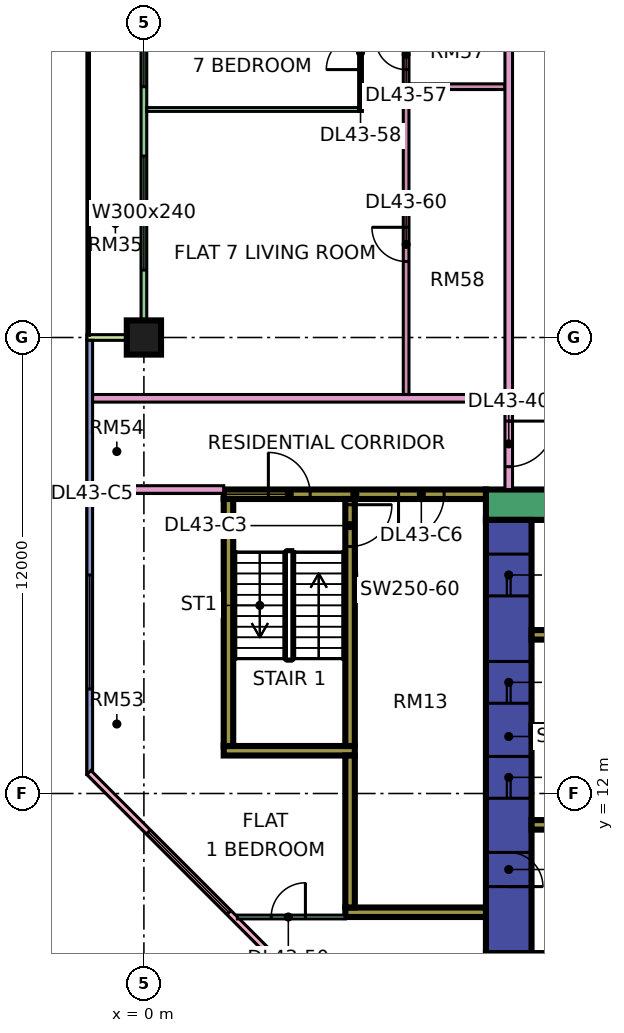
"""IFC4 building model, lengths in metres.
Left out: names, types, materials, properties, quantities, classifications, styles, units other than length and angle.
Written with IfcOpenShell. Run it as: python <this file> out.ifc"""

import sys

from ifc_helpers import new_model, si_unit, direction, frame, frame_2d, origin, origin_2d, place, context, subcontext, project, spatial, rectangle, extrude, element, fill, save


model = new_model("IFC4")
c1 = context("Model", 3, precision=1e-05, world=origin(), true_north=direction((0.0, 1.0)))
c2 = subcontext(c1, "Body", "Model", "MODEL_VIEW")
j1 = project(units=[si_unit("LENGTHUNIT", "METRE"), si_unit("PLANEANGLEUNIT", "RADIAN")], contexts=[c1])
p1 = place(None, origin())
s1 = spatial("IfcSite", under=j1, at=p1, CompositionType="ELEMENT")
p2 = place(p1, origin())
s2 = spatial("IfcBuilding", under=s1, at=p2, CompositionType="ELEMENT")
p3 = place(p2, frame((0.0, 0.0, 187.4)))
s3 = spatial("IfcBuildingStorey", under=s2, at=p3, CompositionType="ELEMENT", Elevation=187.4)
p4 = place(p3, frame((0.0, 24.0, 0.0), z_axis=(0.0, 0.0, 1.0), x_axis=(1.0, 0.0, 0.0)))
e1 = element("IfcColumn", 1, at=p4, inside=s3, PredefinedType="COLUMN", context=c2, shape_type="SweptSolid", body=[
    extrude(rectangle(XDim=0.9, YDim=0.9, at=origin_2d()), origin(), (0.0, 0.0, 1.0), 3.75),
])
p5 = place(p3, frame((9.0, 19.6, 0.0), z_axis=(0.0, 0.0, 1.0), x_axis=(1.0, 0.0, 0.0)))
e2 = element("IfcWall", 2, at=p5, inside=s3, PredefinedType="SHEAR", context=c2, shape_type="SweptSolid", body=[
    extrude(rectangle(XDim=25.0, YDim=0.8, at=frame_2d((12.5, 0.0))), origin(), (0.0, 0.0, 1.0), 3.75),
])
p6 = place(p5, frame((19.1, 0.0, 0.0)))
e3 = element("IfcOpeningElement", 3, at=p6, cuts=e2, PredefinedType="OPENING", context=c2, shape_type="SweptSolid", body=[
    extrude(rectangle(XDim=1.8, YDim=2.4, at=frame_2d((0.9, 1.2))), frame((0.0, 0.41, 0.0), z_axis=(0.0, -1.0, 0.0), x_axis=(1.0, 0.0, 0.0)), (0.0, 0.0, 1.0), 0.82),
])
p7 = place(p3, frame((9.6, 7.8, 0.0), z_axis=(0.0, 0.0, 1.0), x_axis=(0.0, 1.0, 0.0)))
e4 = element("IfcWall", 4, at=p7, inside=s3, PredefinedType="SHEAR", context=c2, shape_type="SweptSolid", body=[
    extrude(rectangle(XDim=11.4, YDim=1.2, at=frame_2d((5.7, 0.0))), origin(), (0.0, 0.0, 1.0), 3.75),
])
p8 = place(p7, frame((4.075, 0.0, 0.0)))
e5 = element("IfcOpeningElement", 5, at=p8, cuts=e4, PredefinedType="OPENING", context=c2, shape_type="SweptSolid", body=[
    extrude(rectangle(XDim=1.1, YDim=2.2, at=frame_2d((0.55, 1.1))), frame((0.0, 0.61, 0.0), z_axis=(0.0, -1.0, 0.0), x_axis=(1.0, 0.0, 0.0)), (0.0, 0.0, 1.0), 1.22),
])
p9 = place(p7, frame((6.575, 0.0, 0.0)))
e6 = element("IfcOpeningElement", 6, at=p9, cuts=e4, PredefinedType="OPENING", context=c2, shape_type="SweptSolid", body=[
    extrude(rectangle(XDim=1.1, YDim=2.2, at=frame_2d((0.55, 1.1))), frame((0.0, 0.61, 0.0), z_axis=(0.0, -1.0, 0.0), x_axis=(1.0, 0.0, 0.0)), (0.0, 0.0, 1.0), 1.22),
])
p10 = place(p7, frame((9.4, 0.0, 0.0)))
e7 = element("IfcOpeningElement", 7, at=p10, cuts=e4, PredefinedType="OPENING", context=c2, shape_type="SweptSolid", body=[
    extrude(rectangle(XDim=1.1, YDim=2.2, at=frame_2d((0.55, 1.1))), frame((0.0, 0.61, 0.0), z_axis=(0.0, -1.0, 0.0), x_axis=(1.0, 0.0, 0.0)), (0.0, 0.0, 1.0), 1.22),
])
p11 = place(p7, frame((1.75, 0.0, 0.0)))
e8 = element("IfcOpeningElement", 8, at=p11, cuts=e4, PredefinedType="OPENING", context=c2, shape_type="SweptSolid", body=[
    extrude(rectangle(XDim=0.9, YDim=2.1, at=frame_2d((0.45, 1.05))), frame((0.0, 0.61, 0.0), z_axis=(0.0, -1.0, 0.0), x_axis=(1.0, 0.0, 0.0)), (0.0, 0.0, 1.0), 1.22),
])
for number, where, z_axis, x_axis in (
    (9, (10.2, 11.175, 0.0), (0.0, 0.0, 1.0), (1.0, 0.0, 0.0)),
    (10, (10.2, 13.675, 0.0), (0.0, 0.0, 1.0), (1.0, 0.0, 0.0)),
    (11, (10.2, 16.175, 0.0), (0.0, 0.0, 1.0), (1.0, 0.0, 0.0)),
):
    element("IfcWall", number, at=place(p3, frame(where, z_axis=z_axis, x_axis=x_axis)), inside=s3, PredefinedType="SHEAR", context=c2, shape_type="SweptSolid", body=[
        extrude(rectangle(XDim=3.0, YDim=0.25, at=frame_2d((1.5, 0.0))), origin(), (0.0, 0.0, 1.0), 3.75),
    ])
p12 = place(p3, frame((2.1, 19.875, 0.0), z_axis=(0.0, 0.0, 1.0), x_axis=(1.0, 0.0, 0.0)))
e12 = element("IfcWall", 12, at=p12, inside=s3, PredefinedType="SHEAR", context=c2, shape_type="SweptSolid", body=[
    extrude(rectangle(XDim=6.9, YDim=0.25, at=frame_2d((3.45, 0.0))), origin(), (0.0, 0.0, 1.0), 3.75),
])
p13 = place(p12, frame((1.175, 0.0, 0.0)))
e13 = element("IfcOpeningElement", 13, at=p13, cuts=e12, PredefinedType="OPENING", context=c2, shape_type="SweptSolid", body=[
    extrude(rectangle(XDim=1.1, YDim=2.2, at=frame_2d((0.55, 1.1))), frame((0.0, 0.135, 0.0), z_axis=(0.0, -1.0, 0.0), x_axis=(1.0, 0.0, 0.0)), (0.0, 0.0, 1.0), 0.27),
])
p14 = place(p12, frame((4.6, 0.0, 0.0)))
e14 = element("IfcOpeningElement", 14, at=p14, cuts=e12, PredefinedType="OPENING", context=c2, shape_type="SweptSolid", body=[
    extrude(rectangle(XDim=1.2, YDim=2.2, at=frame_2d((0.6, 1.1))), frame((0.0, 0.135, 0.0), z_axis=(0.0, -1.0, 0.0), x_axis=(1.0, 0.0, 0.0)), (0.0, 0.0, 1.0), 0.27),
])
p15 = place(p3, frame((2.1, 13.125, 0.0), z_axis=(0.0, 0.0, 1.0), x_axis=(1.0, 0.0, 0.0)))
e15 = element("IfcWall", 15, at=p15, inside=s3, PredefinedType="SHEAR", context=c2, shape_type="SweptSolid", body=[
    extrude(rectangle(XDim=3.45, YDim=0.25, at=frame_2d((1.725, 0.0))), origin(), (0.0, 0.0, 1.0), 3.75),
])
p16 = place(p3, frame((2.225, 13.25, 0.0), z_axis=(0.0, 0.0, 1.0), x_axis=(0.0, 1.0, 0.0)))
e16 = element("IfcWall", 16, at=p16, inside=s3, PredefinedType="SHEAR", context=c2, shape_type="SweptSolid", body=[
    extrude(rectangle(XDim=6.5, YDim=0.25, at=frame_2d((3.25, 0.0))), origin(), (0.0, 0.0, 1.0), 3.75),
])
p17 = place(p3, frame((5.425, 13.25, 0.0), z_axis=(0.0, 0.0, 1.0), x_axis=(0.0, 1.0, 0.0)))
e17 = element("IfcWall", 17, at=p17, inside=s3, PredefinedType="SHEAR", context=c2, shape_type="SweptSolid", body=[
    extrude(rectangle(XDim=6.5, YDim=0.25, at=frame_2d((3.25, 0.0))), origin(), (0.0, 0.0, 1.0), 3.75),
])
p18 = place(p17, frame((5.25, 0.0, 0.0)))
e18 = element("IfcOpeningElement", 18, at=p18, cuts=e17, PredefinedType="OPENING", context=c2, shape_type="SweptSolid", body=[
    extrude(rectangle(XDim=1.1, YDim=2.2, at=frame_2d((0.55, 1.1))), frame((0.0, 0.135, 0.0), z_axis=(0.0, -1.0, 0.0), x_axis=(1.0, 0.0, 0.0)), (0.0, 0.0, 1.0), 0.27),
])
p19 = place(p3, frame((5.3, 8.875, 0.0), z_axis=(0.0, 0.0, 1.0), x_axis=(1.0, 0.0, 0.0)))
e19 = element("IfcWall", 19, at=p19, inside=s3, PredefinedType="SHEAR", context=c2, shape_type="SweptSolid", body=[
    extrude(rectangle(XDim=3.7, YDim=0.25, at=frame_2d((1.85, 0.0))), origin(), (0.0, 0.0, 1.0), 3.75),
])
p20 = place(p3, frame((5.425, 9.0, 0.0), z_axis=(0.0, 0.0, 1.0), x_axis=(0.0, 1.0, 0.0)))
e20 = element("IfcWall", 20, at=p20, inside=s3, PredefinedType="SHEAR", context=c2, shape_type="SweptSolid", body=[
    extrude(rectangle(XDim=4.0, YDim=0.25, at=frame_2d((2.0, 0.0))), origin(), (0.0, 0.0, 1.0), 3.75),
])
p21 = place(p3, frame((0.0, 35.925, 0.0), z_axis=(0.0, 0.0, 1.0), x_axis=(0.0, -1.0, 0.0)))
e21 = element("IfcWall", 21, at=p21, inside=s3, PredefinedType="SOLIDWALL", context=c2, shape_type="SweptSolid", body=[
    extrude(rectangle(XDim=11.85, YDim=0.15, at=frame_2d((5.925, 0.0))), origin(), (0.0, 0.0, 1.0), 3.35),
])
p22 = place(p21, frame((1.1, 0.0, 0.0)))
e22 = element("IfcOpeningElement", 22, at=p22, cuts=e21, PredefinedType="OPENING", context=c2, shape_type="SweptSolid", body=[
    extrude(rectangle(XDim=1.2, YDim=2.4, at=frame_2d((0.6, 1.2))), frame((0.0, 0.085, 0.0), z_axis=(0.0, -1.0, 0.0), x_axis=(1.0, 0.0, 0.0)), (0.0, 0.0, 1.0), 0.17),
])
p23 = place(p21, frame((3.525, 0.0, 0.45)))
e23 = element("IfcOpeningElement", 23, at=p23, cuts=e21, PredefinedType="OPENING", context=c2, shape_type="SweptSolid", body=[
    extrude(rectangle(XDim=1.8, YDim=2.4, at=frame_2d((0.9, 1.2))), frame((0.0, 0.085, 0.0), z_axis=(0.0, -1.0, 0.0), x_axis=(1.0, 0.0, 0.0)), (0.0, 0.0, 1.0), 0.17),
])
p24 = place(p21, frame((7.15, 0.0, 0.45)))
e24 = element("IfcOpeningElement", 24, at=p24, cuts=e21, PredefinedType="OPENING", context=c2, shape_type="SweptSolid", body=[
    extrude(rectangle(XDim=3.0, YDim=2.4, at=frame_2d((1.5, 1.2))), frame((0.0, 0.085, 0.0), z_axis=(0.0, -1.0, 0.0), x_axis=(1.0, 0.0, 0.0)), (0.0, 0.0, 1.0), 0.17),
])
p25 = place(p3, frame((-1.5, 24.0, 0.0), z_axis=(0.0, 0.0, 1.0), x_axis=(1.0, 0.0, 0.0)))
e25 = element("IfcWall", 25, at=p25, inside=s3, PredefinedType="SOLIDWALL", context=c2, shape_type="SweptSolid", body=[
    extrude(rectangle(XDim=1.5, YDim=0.15, at=frame_2d((0.75, 0.0))), origin(), (0.0, 0.0, 1.0), 3.35),
])
p26 = place(p3, frame((-1.425, 23.925, 0.0), z_axis=(0.0, 0.0, 1.0), x_axis=(0.0, -1.0, 0.0)))
e26 = element("IfcWall", 26, at=p26, inside=s3, PredefinedType="SOLIDWALL", context=c2, shape_type="SweptSolid", body=[
    extrude(rectangle(XDim=11.425, YDim=0.15, at=frame_2d((5.712, 0.0))), origin(), (0.0, 0.0, 1.0), 3.35),
])
p27 = place(p26, frame((6.175, 0.0, 0.45)))
e27 = element("IfcOpeningElement", 27, at=p27, cuts=e26, PredefinedType="OPENING", context=c2, shape_type="SweptSolid", body=[
    extrude(rectangle(XDim=3.0, YDim=2.4, at=frame_2d((1.5, 1.2))), frame((0.0, 0.085, 0.0), z_axis=(0.0, -1.0, 0.0), x_axis=(1.0, 0.0, 0.0)), (0.0, 0.0, 1.0), 0.17),
])
p28 = place(p3, frame((-1.447, 12.553, 0.0), z_axis=(0.0, 0.0, 1.0), x_axis=(0.707106781187, -0.707106781187, 0.0)))
e28 = element("IfcWall", 28, at=p28, inside=s3, PredefinedType="SOLIDWALL", context=c2, shape_type="SweptSolid", body=[
    extrude(rectangle(XDim=19.799, YDim=0.15, at=frame_2d((9.899, 0.0))), origin(), (0.0, 0.0, 1.0), 3.35),
])
p29 = place(p28, frame((2.212, 0.0, 0.45)))
e29 = element("IfcOpeningElement", 29, at=p29, cuts=e28, PredefinedType="OPENING", context=c2, shape_type="SweptSolid", body=[
    extrude(rectangle(XDim=3.0, YDim=2.4, at=frame_2d((1.5, 1.2))), frame((0.0, 0.085, 0.0), z_axis=(0.0, -1.0, 0.0), x_axis=(1.0, 0.0, 0.0)), (0.0, 0.0, 1.0), 0.17),
])
p30 = place(p28, frame((10.216, 0.0, 0.45)))
e30 = element("IfcOpeningElement", 30, at=p30, cuts=e28, PredefinedType="OPENING", context=c2, shape_type="SweptSolid", body=[
    extrude(rectangle(XDim=3.0, YDim=2.4, at=frame_2d((1.5, 1.2))), frame((0.0, 0.085, 0.0), z_axis=(0.0, -1.0, 0.0), x_axis=(1.0, 0.0, 0.0)), (0.0, 0.0, 1.0), 0.17),
])
p31 = place(p3, frame((-1.35, 20.0, 0.0), z_axis=(0.0, 0.0, 1.0), x_axis=(1.0, 0.0, 0.0)))
e31 = element("IfcWall", 31, at=p31, inside=s3, PredefinedType="PARTITIONING", context=c2, shape_type="SweptSolid", body=[
    extrude(rectangle(XDim=3.45, YDim=0.2, at=frame_2d((1.725, 0.0))), origin(), (0.0, 0.0, 1.0), 3.35),
])
p32 = place(p3, frame((-1.35, 22.4, 0.0), z_axis=(0.0, 0.0, 1.0), x_axis=(1.0, 0.0, 0.0)))
e32 = element("IfcWall", 32, at=p32, inside=s3, PredefinedType="PARTITIONING", context=c2, shape_type="SweptSolid", body=[
    extrude(rectangle(XDim=10.85, YDim=0.2, at=frame_2d((5.425, 0.0))), origin(), (0.0, 0.0, 1.0), 3.35),
])
p33 = place(p3, frame((0.074, 30.0, 0.0), z_axis=(0.0, 0.0, 1.0), x_axis=(1.0, 0.0, 0.0)))
e33 = element("IfcWall", 33, at=p33, inside=s3, PredefinedType="PARTITIONING", context=c2, shape_type="SweptSolid", body=[
    extrude(rectangle(XDim=5.576, YDim=0.1, at=frame_2d((2.788, 0.0))), origin(), (0.0, 0.0, 1.0), 3.35),
])
p34 = place(p3, frame((2.461, 8.75, 0.0), z_axis=(0.0, 0.0, 1.0), x_axis=(1.0, 0.0, 0.0)))
e34 = element("IfcWall", 34, at=p34, inside=s3, PredefinedType="PARTITIONING", context=c2, shape_type="SweptSolid", body=[
    extrude(rectangle(XDim=2.839, YDim=0.1, at=frame_2d((1.419, 0.0))), origin(), (0.0, 0.0, 1.0), 3.35),
])
p35 = place(p34, frame((0.889, 0.0, 0.0)))
e35 = element("IfcOpeningElement", 35, at=p35, cuts=e34, PredefinedType="OPENING", context=c2, shape_type="SweptSolid", body=[
    extrude(rectangle(XDim=0.9, YDim=2.1, at=frame_2d((0.45, 1.05))), frame((0.0, 0.06, 0.0), z_axis=(0.0, -1.0, 0.0), x_axis=(1.0, 0.0, 0.0)), (0.0, 0.0, 1.0), 0.12),
])
p36 = place(p3, frame((5.7, 29.95, 0.0), z_axis=(0.0, 0.0, 1.0), x_axis=(0.0, 1.0, 0.0)))
e36 = element("IfcWall", 36, at=p36, inside=s3, PredefinedType="PARTITIONING", context=c2, shape_type="SweptSolid", body=[
    extrude(rectangle(XDim=5.95, YDim=0.1, at=frame_2d((2.975, 0.0))), origin(), (0.0, 0.0, 1.0), 3.35),
])
p37 = place(p36, frame((1.1, 0.0, 0.0)))
e37 = element("IfcOpeningElement", 37, at=p37, cuts=e36, PredefinedType="OPENING", context=c2, shape_type="SweptSolid", body=[
    extrude(rectangle(XDim=0.9, YDim=2.1, at=frame_2d((0.45, 1.05))), frame((0.0, 0.06, 0.0), z_axis=(0.0, -1.0, 0.0), x_axis=(1.0, 0.0, 0.0)), (0.0, 0.0, 1.0), 0.12),
])
p38 = place(p36, frame((4.1, 0.0, 0.0)))
e38 = element("IfcOpeningElement", 38, at=p38, cuts=e36, PredefinedType="OPENING", context=c2, shape_type="SweptSolid", body=[
    extrude(rectangle(XDim=0.9, YDim=2.1, at=frame_2d((0.45, 1.05))), frame((0.0, 0.06, 0.0), z_axis=(0.0, -1.0, 0.0), x_axis=(1.0, 0.0, 0.0)), (0.0, 0.0, 1.0), 0.12),
])
p39 = place(p3, frame((6.9, 22.5, 0.0), z_axis=(0.0, 0.0, 1.0), x_axis=(0.0, 1.0, 0.0)))
e39 = element("IfcWall", 39, at=p39, inside=s3, PredefinedType="PARTITIONING", context=c2, shape_type="SweptSolid", body=[
    extrude(rectangle(XDim=9.975, YDim=0.15, at=frame_2d((4.988, 0.0))), origin(), (0.0, 0.0, 1.0), 3.35),
])
p40 = place(p39, frame((8.55, 0.0, 0.0)))
e40 = element("IfcOpeningElement", 40, at=p40, cuts=e39, PredefinedType="OPENING", context=c2, shape_type="SweptSolid", body=[
    extrude(rectangle(XDim=0.8, YDim=2.1, at=frame_2d((0.4, 1.05))), frame((0.0, 0.085, 0.0), z_axis=(0.0, -1.0, 0.0), x_axis=(1.0, 0.0, 0.0)), (0.0, 0.0, 1.0), 0.17),
])
p41 = place(p39, frame((3.5, 0.0, 0.0)))
e41 = element("IfcOpeningElement", 41, at=p41, cuts=e39, PredefinedType="OPENING", context=c2, shape_type="SweptSolid", body=[
    extrude(rectangle(XDim=0.9, YDim=2.1, at=frame_2d((0.45, 1.05))), frame((0.0, 0.085, 0.0), z_axis=(0.0, -1.0, 0.0), x_axis=(1.0, 0.0, 0.0)), (0.0, 0.0, 1.0), 0.17),
])
p42 = place(p3, frame((6.975, 30.6, 0.0), z_axis=(0.0, 0.0, 1.0), x_axis=(1.0, 0.0, 0.0)))
e42 = element("IfcWall", 42, at=p42, inside=s3, PredefinedType="PARTITIONING", context=c2, shape_type="SweptSolid", body=[
    extrude(rectangle(XDim=2.525, YDim=0.15, at=frame_2d((1.262, 0.0))), origin(), (0.0, 0.0, 1.0), 3.35),
])
p43 = place(p3, frame((9.6, 20.0, 0.0), z_axis=(0.0, 0.0, 1.0), x_axis=(0.0, 1.0, 0.0)))
e43 = element("IfcWall", 43, at=p43, inside=s3, PredefinedType="PARTITIONING", context=c2, shape_type="SweptSolid", body=[
    extrude(rectangle(XDim=42.926, YDim=0.2, at=frame_2d((21.463, 0.0))), origin(), (0.0, 0.0, 1.0), 3.35),
])
p44 = place(p43, frame((31.65, 0.0, 0.0)))
e44 = element("IfcOpeningElement", 44, at=p44, cuts=e43, PredefinedType="OPENING", context=c2, shape_type="SweptSolid", body=[
    extrude(rectangle(XDim=1.0, YDim=2.1, at=frame_2d((0.5, 1.05))), frame((0.0, 0.11, 0.0), z_axis=(0.0, -1.0, 0.0), x_axis=(1.0, 0.0, 0.0)), (0.0, 0.0, 1.0), 0.22),
])
p45 = place(p43, frame((0.6, 0.0, 0.0)))
e45 = element("IfcOpeningElement", 45, at=p45, cuts=e43, PredefinedType="OPENING", context=c2, shape_type="SweptSolid", body=[
    extrude(rectangle(XDim=1.2, YDim=2.1, at=frame_2d((0.6, 1.05))), frame((0.0, 0.11, 0.0), z_axis=(0.0, -1.0, 0.0), x_axis=(1.0, 0.0, 0.0)), (0.0, 0.0, 1.0), 0.22),
])
p46 = place(p43, frame((13.65, 0.0, 0.0)))
e46 = element("IfcOpeningElement", 46, at=p46, cuts=e43, PredefinedType="OPENING", context=c2, shape_type="SweptSolid", body=[
    extrude(rectangle(XDim=1.0, YDim=2.1, at=frame_2d((0.5, 1.05))), frame((0.0, 0.11, 0.0), z_axis=(0.0, -1.0, 0.0), x_axis=(1.0, 0.0, 0.0)), (0.0, 0.0, 1.0), 0.22),
])
p47 = place(p23, origin())
e47 = element("IfcWindow", 47, at=p47, inside=s3, PartitioningType="SINGLE_PANEL", PredefinedType="WINDOW", context=c2, shape_type="SweptSolid", body=[
    extrude(rectangle(XDim=1.8, YDim=2.4, at=frame_2d((0.9, 1.2))), frame((0.0, 0.03, 0.0), z_axis=(0.0, -1.0, 0.0), x_axis=(1.0, 0.0, 0.0)), (0.0, 0.0, 1.0), 0.06),
])
fill(e23, e47)
p48 = place(p24, origin())
e48 = element("IfcWindow", 48, at=p48, inside=s3, PartitioningType="SINGLE_PANEL", PredefinedType="WINDOW", context=c2, shape_type="SweptSolid", body=[
    extrude(rectangle(XDim=3.0, YDim=2.4, at=frame_2d((1.5, 1.2))), frame((0.0, 0.03, 0.0), z_axis=(0.0, -1.0, 0.0), x_axis=(1.0, 0.0, 0.0)), (0.0, 0.0, 1.0), 0.06),
])
fill(e24, e48)
p49 = place(p27, origin())
e49 = element("IfcWindow", 49, at=p49, inside=s3, PartitioningType="SINGLE_PANEL", PredefinedType="WINDOW", context=c2, shape_type="SweptSolid", body=[
    extrude(rectangle(XDim=3.0, YDim=2.4, at=frame_2d((1.5, 1.2))), frame((0.0, 0.03, 0.0), z_axis=(0.0, -1.0, 0.0), x_axis=(1.0, 0.0, 0.0)), (0.0, 0.0, 1.0), 0.06),
])
fill(e27, e49)
p50 = place(p29, origin())
e50 = element("IfcWindow", 50, at=p50, inside=s3, PartitioningType="SINGLE_PANEL", PredefinedType="WINDOW", context=c2, shape_type="SweptSolid", body=[
    extrude(rectangle(XDim=3.0, YDim=2.4, at=frame_2d((1.5, 1.2))), frame((0.0, 0.03, 0.0), z_axis=(0.0, -1.0, 0.0), x_axis=(1.0, 0.0, 0.0)), (0.0, 0.0, 1.0), 0.06),
])
fill(e29, e50)
p51 = place(p8, origin())
e51 = element("IfcDoor", 51, at=p51, inside=s3, OperationType="DOUBLE_DOOR_SLIDING", PredefinedType="DOOR", context=c2, shape_type="SweptSolid", body=[
    extrude(rectangle(XDim=1.1, YDim=2.2, at=frame_2d((0.55, 1.1))), frame((0.0, 0.025, 0.0), z_axis=(0.0, -1.0, 0.0), x_axis=(1.0, 0.0, 0.0)), (0.0, 0.0, 1.0), 0.05),
])
fill(e5, e51)
p52 = place(p9, origin())
e52 = element("IfcDoor", 52, at=p52, inside=s3, OperationType="DOUBLE_DOOR_SLIDING", PredefinedType="DOOR", context=c2, shape_type="SweptSolid", body=[
    extrude(rectangle(XDim=1.1, YDim=2.2, at=frame_2d((0.55, 1.1))), frame((0.0, 0.025, 0.0), z_axis=(0.0, -1.0, 0.0), x_axis=(1.0, 0.0, 0.0)), (0.0, 0.0, 1.0), 0.05),
])
fill(e6, e52)
p53 = place(p10, origin())
e53 = element("IfcDoor", 53, at=p53, inside=s3, OperationType="DOUBLE_DOOR_SLIDING", PredefinedType="DOOR", context=c2, shape_type="SweptSolid", body=[
    extrude(rectangle(XDim=1.1, YDim=2.2, at=frame_2d((0.55, 1.1))), frame((0.0, 0.025, 0.0), z_axis=(0.0, -1.0, 0.0), x_axis=(1.0, 0.0, 0.0)), (0.0, 0.0, 1.0), 0.05),
])
fill(e7, e53)
p54 = place(p18, origin())
e54 = element("IfcDoor", 54, at=p54, inside=s3, OperationType="SINGLE_SWING_RIGHT", PredefinedType="DOOR", context=c2, shape_type="SweptSolid", body=[
    extrude(rectangle(XDim=1.1, YDim=2.2, at=frame_2d((0.55, 1.1))), frame((0.0, 0.025, 0.0), z_axis=(0.0, -1.0, 0.0), x_axis=(1.0, 0.0, 0.0)), (0.0, 0.0, 1.0), 0.05),
])
fill(e18, e54)
p55 = place(p11, frame((0.9, 0.0, 0.0), z_axis=(0.0, 0.0, 1.0), x_axis=(-1.0, 0.0, 0.0)))
e55 = element("IfcDoor", 55, at=p55, inside=s3, OperationType="SINGLE_SWING_LEFT", PredefinedType="DOOR", context=c2, shape_type="SweptSolid", body=[
    extrude(rectangle(XDim=0.9, YDim=2.1, at=frame_2d((0.45, 1.05))), frame((0.0, 0.025, 0.0), z_axis=(0.0, -1.0, 0.0), x_axis=(1.0, 0.0, 0.0)), (0.0, 0.0, 1.0), 0.05),
])
fill(e8, e55)
p56 = place(p13, origin())
e56 = element("IfcDoor", 56, at=p56, inside=s3, OperationType="SINGLE_SWING_LEFT", PredefinedType="DOOR", context=c2, shape_type="SweptSolid", body=[
    extrude(rectangle(XDim=1.1, YDim=2.2, at=frame_2d((0.55, 1.1))), frame((0.0, 0.025, 0.0), z_axis=(0.0, -1.0, 0.0), x_axis=(1.0, 0.0, 0.0)), (0.0, 0.0, 1.0), 0.05),
])
fill(e13, e56)
p57 = place(p14, frame((1.2, 0.0, 0.0), z_axis=(0.0, 0.0, 1.0), x_axis=(-1.0, 0.0, 0.0)))
e57 = element("IfcDoor", 57, at=p57, inside=s3, OperationType="SINGLE_SWING_LEFT", PredefinedType="DOOR", context=c2, shape_type="SweptSolid", body=[
    extrude(rectangle(XDim=1.2, YDim=2.2, at=frame_2d((0.6, 1.1))), frame((0.0, 0.025, 0.0), z_axis=(0.0, -1.0, 0.0), x_axis=(1.0, 0.0, 0.0)), (0.0, 0.0, 1.0), 0.05),
])
fill(e14, e57)
p58 = place(p45, origin())
e58 = element("IfcDoor", 58, at=p58, inside=s3, OperationType="SINGLE_SWING_RIGHT", PredefinedType="DOOR", context=c2, shape_type="SweptSolid", body=[
    extrude(rectangle(XDim=1.2, YDim=2.1, at=frame_2d((0.6, 1.05))), frame((0.0, 0.025, 0.0), z_axis=(0.0, -1.0, 0.0), x_axis=(1.0, 0.0, 0.0)), (0.0, 0.0, 1.0), 0.05),
])
fill(e45, e58)
p59 = place(p35, frame((0.9, 0.0, 0.0), z_axis=(0.0, 0.0, 1.0), x_axis=(-1.0, 0.0, 0.0)))
e59 = element("IfcDoor", 59, at=p59, inside=s3, OperationType="SINGLE_SWING_RIGHT", PredefinedType="DOOR", context=c2, shape_type="SweptSolid", body=[
    extrude(rectangle(XDim=0.9, YDim=2.1, at=frame_2d((0.45, 1.05))), frame((0.0, 0.025, 0.0), z_axis=(0.0, -1.0, 0.0), x_axis=(1.0, 0.0, 0.0)), (0.0, 0.0, 1.0), 0.05),
])
fill(e35, e59)
p60 = place(p40, frame((0.8, 0.0, 0.0), z_axis=(0.0, 0.0, 1.0), x_axis=(-1.0, 0.0, 0.0)))
e60 = element("IfcDoor", 60, at=p60, inside=s3, OperationType="SINGLE_SWING_RIGHT", PredefinedType="DOOR", context=c2, shape_type="SweptSolid", body=[
    extrude(rectangle(XDim=0.8, YDim=2.1, at=frame_2d((0.4, 1.05))), frame((0.0, 0.025, 0.0), z_axis=(0.0, -1.0, 0.0), x_axis=(1.0, 0.0, 0.0)), (0.0, 0.0, 1.0), 0.05),
])
fill(e40, e60)
p61 = place(p37, origin())
e61 = element("IfcDoor", 61, at=p61, inside=s3, OperationType="SINGLE_SWING_LEFT", PredefinedType="DOOR", context=c2, shape_type="SweptSolid", body=[
    extrude(rectangle(XDim=0.9, YDim=2.1, at=frame_2d((0.45, 1.05))), frame((0.0, 0.025, 0.0), z_axis=(0.0, -1.0, 0.0), x_axis=(1.0, 0.0, 0.0)), (0.0, 0.0, 1.0), 0.05),
])
fill(e37, e61)
p62 = place(p41, frame((0.9, 0.0, 0.0), z_axis=(0.0, 0.0, 1.0), x_axis=(-1.0, 0.0, 0.0)))
e62 = element("IfcDoor", 62, at=p62, inside=s3, OperationType="SINGLE_SWING_RIGHT", PredefinedType="DOOR", context=c2, shape_type="SweptSolid", body=[
    extrude(rectangle(XDim=0.9, YDim=2.1, at=frame_2d((0.45, 1.05))), frame((0.0, 0.025, 0.0), z_axis=(0.0, -1.0, 0.0), x_axis=(1.0, 0.0, 0.0)), (0.0, 0.0, 1.0), 0.05),
])
fill(e41, e62)
save(model, sys.argv[1])
